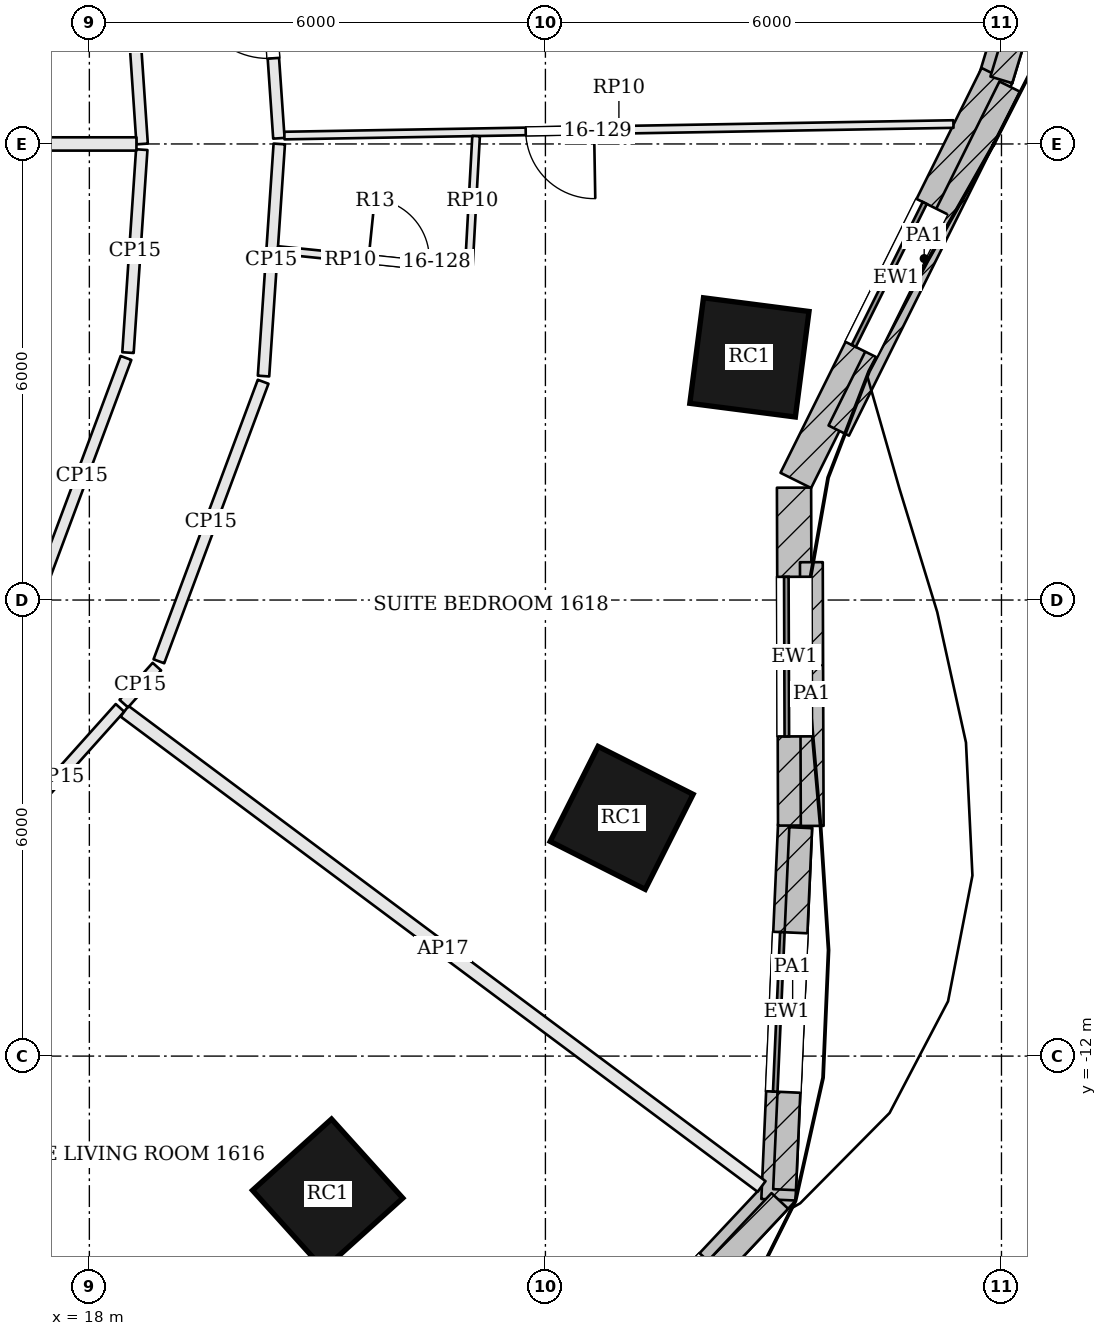
"""IFC4 building model, lengths in metres.
Left out: names, types, materials, properties, quantities, classifications, styles, units other than length and angle.
Written with IfcOpenShell. Run it as: python <this file> out.ifc"""

import sys

from ifc_helpers import new_model, si_unit, direction, frame, frame_2d, origin, origin_2d, place, context, subcontext, project, spatial, rectangle, extrude, element, fill, save


model = new_model("IFC4")
c1 = context("Model", 3, precision=1e-05, world=origin(), true_north=direction((0.0, 1.0)))
c2 = subcontext(c1, "Body", "Model", "MODEL_VIEW")
j1 = project(units=[si_unit("LENGTHUNIT", "METRE"), si_unit("PLANEANGLEUNIT", "RADIAN")], contexts=[c1])
p1 = place(None, origin())
s1 = spatial("IfcSite", under=j1, at=p1, CompositionType="ELEMENT")
p2 = place(p1, origin())
s2 = spatial("IfcBuilding", under=s1, at=p2, CompositionType="ELEMENT")
p3 = place(p2, frame((0.0, 0.0, 73.5)))
s3 = spatial("IfcBuildingStorey", under=s2, at=p3, CompositionType="ELEMENT", Elevation=73.5)
for number, where, z_axis, x_axis in (
    (1, (21.135, -13.817, 0.0), (0.0, 0.0, 1.0), (0.743, 0.67, 0.0)),
    (2, (25.003, -8.866, 0.0), (0.0, 0.0, 1.0), (0.45, 0.893, 0.0)),
    (3, (26.684, -2.808, 0.0), (0.0, 0.0, 1.0), (0.128, 0.992, 0.0)),
):
    element("IfcColumn", number, at=place(p3, frame(where, z_axis=z_axis, x_axis=x_axis)), inside=s3, PredefinedType="COLUMN", context=c2, shape_type="SweptSolid", body=[
        extrude(rectangle(XDim=1.4, YDim=1.4, at=origin_2d()), origin(), (0.0, 0.0, 1.0), 2.8),
    ])
p4 = place(p3, frame((29.927, 0.865, 0.0), z_axis=(0.0, 0.0, 1.0), x_axis=(0.289432445378, 0.957198443147, 0.0)))
e4 = element("IfcWall", 4, at=p4, inside=s3, PredefinedType="SOLIDWALL", context=c2, shape_type="SweptSolid", body=[
    extrude(rectangle(XDim=4.361, YDim=0.45, at=frame_2d((2.181, 0.0))), origin(), (0.0, 0.0, 1.0), 3.3),
])
p5 = place(p4, frame((1.131, 0.0, 0.9)))
e5 = element("IfcOpeningElement", 5, at=p5, cuts=e4, PredefinedType="OPENING", context=c2, shape_type="SweptSolid", body=[
    extrude(rectangle(XDim=2.1, YDim=1.8, at=frame_2d((1.05, 0.9))), frame((0.0, 0.235, 0.0), z_axis=(0.0, -1.0, 0.0), x_axis=(1.0, 0.0, 0.0)), (0.0, 0.0, 1.0), 0.47),
])
p6 = place(p3, frame((23.822, -17.273, 0.0), z_axis=(0.0, 0.0, 1.0), x_axis=(0.684173167988, 0.729319598122, 0.0)))
e6 = element("IfcWall", 6, at=p6, inside=s3, PredefinedType="SOLIDWALL", context=c2, shape_type="SweptSolid", body=[
    extrude(rectangle(XDim=4.829, YDim=0.45, at=frame_2d((2.415, 0.0))), origin(), (0.0, 0.0, 1.0), 3.3),
])
p7 = place(p6, frame((1.365, 0.0, 0.9)))
e7 = element("IfcOpeningElement", 7, at=p7, cuts=e6, PredefinedType="OPENING", context=c2, shape_type="SweptSolid", body=[
    extrude(rectangle(XDim=2.1, YDim=1.8, at=frame_2d((1.05, 0.9))), frame((0.0, 0.235, 0.0), z_axis=(0.0, -1.0, 0.0), x_axis=(1.0, 0.0, 0.0)), (0.0, 0.0, 1.0), 0.47),
])
p8 = place(p3, frame((27.065, -13.89, 0.0), z_axis=(0.0, 0.0, 1.0), x_axis=(0.044544250924, 0.99900741224, 0.0)))
e8 = element("IfcWall", 8, at=p8, inside=s3, PredefinedType="SOLIDWALL", context=c2, shape_type="SweptSolid", body=[
    extrude(rectangle(XDim=4.938, YDim=0.45, at=frame_2d((2.469, 0.0))), origin(), (0.0, 0.0, 1.0), 3.3),
])
p9 = place(p8, frame((1.419, 0.0, 0.9)))
e9 = element("IfcOpeningElement", 9, at=p9, cuts=e8, PredefinedType="OPENING", context=c2, shape_type="SweptSolid", body=[
    extrude(rectangle(XDim=2.1, YDim=1.8, at=frame_2d((1.05, 0.9))), frame((0.0, 0.235, 0.0), z_axis=(0.0, -1.0, 0.0), x_axis=(1.0, 0.0, 0.0)), (0.0, 0.0, 1.0), 0.47),
])
p10 = place(p3, frame((27.285, -8.967, 0.0), z_axis=(0.0, 0.0, 1.0), x_axis=(-0.003185571797, 0.999994926053, 0.0)))
e10 = element("IfcWall", 10, at=p10, inside=s3, PredefinedType="SOLIDWALL", context=c2, shape_type="SweptSolid", body=[
    extrude(rectangle(XDim=4.445, YDim=0.45, at=frame_2d((2.223, 0.0))), origin(), (0.0, 0.0, 1.0), 3.3),
])
p11 = place(p10, frame((1.173, 0.0, 0.9)))
e11 = element("IfcOpeningElement", 11, at=p11, cuts=e10, PredefinedType="OPENING", context=c2, shape_type="SweptSolid", body=[
    extrude(rectangle(XDim=2.1, YDim=1.8, at=frame_2d((1.05, 0.9))), frame((0.0, 0.235, 0.0), z_axis=(0.0, -1.0, 0.0), x_axis=(1.0, 0.0, 0.0)), (0.0, 0.0, 1.0), 0.47),
])
p12 = place(p3, frame((27.294, -4.427, 0.0), z_axis=(0.0, 0.0, 1.0), x_axis=(0.444913249375, 0.895573671191, 0.0)))
e12 = element("IfcWall", 12, at=p12, inside=s3, PredefinedType="SOLIDWALL", context=c2, shape_type="SweptSolid", body=[
    extrude(rectangle(XDim=5.947, YDim=0.45, at=frame_2d((2.974, 0.0))), origin(), (0.0, 0.0, 1.0), 3.3),
])
p13 = place(p12, frame((1.924, 0.0, 0.9)))
e13 = element("IfcOpeningElement", 13, at=p13, cuts=e12, PredefinedType="OPENING", context=c2, shape_type="SweptSolid", body=[
    extrude(rectangle(XDim=2.1, YDim=1.8, at=frame_2d((1.05, 0.9))), frame((0.0, 0.235, 0.0), z_axis=(0.0, -1.0, 0.0), x_axis=(1.0, 0.0, 0.0)), (0.0, 0.0, 1.0), 0.47),
])
p14 = place(p3, frame((29.998, 0.843, 3.6), z_axis=(0.0, 0.0, 1.0), x_axis=(0.289403108737, 0.95720731331, 0.0)))
e14 = element("IfcWall", 14, at=p14, inside=s3, PredefinedType="PARAPET", context=c2, shape_type="SweptSolid", body=[
    extrude(rectangle(XDim=4.205, YDim=0.3, at=frame_2d((2.103, 0.0))), origin(), (0.0, 0.0, 1.0), 1.1),
])
p15 = place(p3, frame((23.972, -17.222, 3.6), z_axis=(0.0, 0.0, 1.0), x_axis=(0.684173231326, 0.729319538705, 0.0)))
e15 = element("IfcWall", 15, at=p15, inside=s3, PredefinedType="PARAPET", context=c2, shape_type="SweptSolid", body=[
    extrude(rectangle(XDim=4.548, YDim=0.3, at=frame_2d((2.274, 0.0))), origin(), (0.0, 0.0, 1.0), 1.1),
])
p16 = place(p3, frame((27.146, -13.757, 3.6), z_axis=(0.0, 0.0, 1.0), x_axis=(0.044503972994, 0.999009207359, 0.0)))
e16 = element("IfcWall", 16, at=p16, inside=s3, PredefinedType="PARAPET", context=c2, shape_type="SweptSolid", body=[
    extrude(rectangle(XDim=4.767, YDim=0.3, at=frame_2d((2.384, 0.0))), origin(), (0.0, 0.0, 1.0), 1.1),
])
p17 = place(p3, frame((27.51, -8.972, 3.6), z_axis=(0.0, 0.0, 1.0), x_axis=(-0.003236912182, 0.999994761186, 0.0)))
e17 = element("IfcWall", 17, at=p17, inside=s3, PredefinedType="PARAPET", context=c2, shape_type="SweptSolid", body=[
    extrude(rectangle(XDim=3.469, YDim=0.3, at=frame_2d((1.735, 0.0))), origin(), (0.0, 0.0, 1.0), 1.1),
])
p18 = place(p3, frame((27.859, -3.771, 3.6), z_axis=(0.0, 0.0, 1.0), x_axis=(0.444912677503, 0.895573955292, 0.0)))
e18 = element("IfcWall", 18, at=p18, inside=s3, PredefinedType="PARAPET", context=c2, shape_type="SweptSolid", body=[
    extrude(rectangle(XDim=5.054, YDim=0.3, at=frame_2d((2.527, 0.0))), origin(), (0.0, 0.0, 1.0), 1.1),
])
p19 = place(p3, frame((16.781, -9.228, 0.0), z_axis=(0.0, 0.0, 1.0), x_axis=(0.667308710912, 0.744781232538, 0.0)))
e19 = element("IfcWall", 19, at=p19, inside=s3, PredefinedType="PARTITIONING", context=c2, shape_type="SweptSolid", body=[
    extrude(rectangle(XDim=2.43, YDim=0.15, at=frame_2d((1.215, 0.0))), origin(), (0.0, 0.0, 1.0), 2.684),
])
p20 = place(p3, frame((26.844, -13.716, 0.0), z_axis=(0.0, 0.0, 1.0), x_axis=(-0.801529984423, 0.597954583619, 0.0)))
e20 = element("IfcWall", 20, at=p20, inside=s3, PredefinedType="PARTITIONING", context=c2, shape_type="SweptSolid", body=[
    extrude(rectangle(XDim=10.456, YDim=0.175, at=frame_2d((5.228, 0.0))), origin(), (0.0, 0.0, 1.0), 2.798),
])
p21 = place(p3, frame((18.453, -7.362, 0.0), z_axis=(0.0, 0.0, 1.0), x_axis=(0.667330462125, 0.744761743325, 0.0)))
e21 = element("IfcWall", 21, at=p21, inside=s3, PredefinedType="PARTITIONING", context=c2, shape_type="SweptSolid", body=[
    extrude(rectangle(XDim=0.653, YDim=0.15, at=frame_2d((0.326, 0.0))), origin(), (0.0, 0.0, 1.0), 2.684),
])
p22 = place(p3, frame((18.915, -6.806, 0.0), z_axis=(0.0, 0.0, 1.0), x_axis=(0.349452792603, 0.936953972051, 0.0)))
e22 = element("IfcWall", 22, at=p22, inside=s3, PredefinedType="PARTITIONING", context=c2, shape_type="SweptSolid", body=[
    extrude(rectangle(XDim=3.925, YDim=0.15, at=frame_2d((1.962, 0.0))), origin(), (0.0, 0.0, 1.0), 2.684),
])
p23 = place(p3, frame((20.292, -3.053, 0.0), z_axis=(0.0, 0.0, 1.0), x_axis=(0.067646719267, 0.997709337118, 0.0)))
e23 = element("IfcWall", 23, at=p23, inside=s3, PredefinedType="PARTITIONING", context=c2, shape_type="SweptSolid", body=[
    extrude(rectangle(XDim=3.061, YDim=0.15, at=frame_2d((1.53, 0.0))), origin(), (0.0, 0.0, 1.0), 2.684),
])
p24 = place(p3, frame((20.493, 0.075, 0.0), z_axis=(0.0, 0.0, 1.0), x_axis=(-0.068600445792, 0.997644214556, 0.0)))
e24 = element("IfcWall", 24, at=p24, inside=s3, PredefinedType="PARTITIONING", context=c2, shape_type="SweptSolid", body=[
    extrude(rectangle(XDim=3.075, YDim=0.15, at=frame_2d((1.538, 0.0))), origin(), (0.0, 0.0, 1.0), 2.684),
])
p25 = place(p24, frame((1.055, 0.0, 0.0)))
e25 = element("IfcOpeningElement", 25, at=p25, cuts=e24, PredefinedType="OPENING", context=c2, shape_type="SweptSolid", body=[
    extrude(rectangle(XDim=1.0, YDim=2.1, at=frame_2d((0.5, 1.05))), frame((0.0, 0.085, 0.0), z_axis=(0.0, -1.0, 0.0), x_axis=(1.0, 0.0, 0.0)), (0.0, 0.0, 1.0), 0.17),
])
p26 = place(p3, frame((18.508, 2.742, 0.0), z_axis=(0.0, 0.0, 1.0), x_axis=(0.067774714774, -0.997700650515, 0.0)))
e26 = element("IfcWall", 26, at=p26, inside=s3, PredefinedType="PARTITIONING", context=c2, shape_type="SweptSolid", body=[
    extrude(rectangle(XDim=2.749, YDim=0.15, at=frame_2d((1.374, 0.0))), origin(), (0.0, 0.0, 1.0), 2.684),
])
p27 = place(p3, frame((18.689, -0.075, 0.0), z_axis=(0.0, 0.0, 1.0), x_axis=(-0.067687508044, -0.997706570718, 0.0)))
e27 = element("IfcWall", 27, at=p27, inside=s3, PredefinedType="PARTITIONING", context=c2, shape_type="SweptSolid", body=[
    extrude(rectangle(XDim=2.676, YDim=0.15, at=frame_2d((1.338, 0.0))), origin(), (0.0, 0.0, 1.0), 2.684),
])
p28 = place(p3, frame((18.482, -2.815, 0.0), z_axis=(0.0, 0.0, 1.0), x_axis=(-0.349448047934, -0.936955741642, 0.0)))
e28 = element("IfcWall", 28, at=p28, inside=s3, PredefinedType="PARTITIONING", context=c2, shape_type="SweptSolid", body=[
    extrude(rectangle(XDim=3.323, YDim=0.15, at=frame_2d((1.661, 0.0))), origin(), (0.0, 0.0, 1.0), 2.684),
])
p29 = place(p3, frame((29.368, 0.262, 0.0), z_axis=(0.0, 0.0, 1.0), x_axis=(-0.99985120268, -0.017250289805, 0.0)))
e29 = element("IfcWall", 29, at=p29, inside=s3, PredefinedType="PARTITIONING", context=c2, shape_type="SweptSolid", body=[
    extrude(rectangle(XDim=8.803, YDim=0.1, at=frame_2d((4.401, 0.0))), origin(), (0.0, 0.0, 1.0), 2.784),
])
p30 = place(p29, frame((4.728, 0.0, 0.0)))
e30 = element("IfcOpeningElement", 30, at=p30, cuts=e29, PredefinedType="OPENING", context=c2, shape_type="SweptSolid", body=[
    extrude(rectangle(XDim=0.9, YDim=2.4, at=frame_2d((0.45, 1.2))), frame((0.0, 0.06, 0.0), z_axis=(0.0, -1.0, 0.0), x_axis=(1.0, 0.0, 0.0)), (0.0, 0.0, 1.0), 0.12),
])
p31 = place(p3, frame((20.479, -1.395, 0.0), z_axis=(0.0, 0.0, 1.0), x_axis=(0.994803809099, -0.101810517152, 0.0)))
e31 = element("IfcWall", 31, at=p31, inside=s3, PredefinedType="PARTITIONING", context=c2, shape_type="SweptSolid", body=[
    extrude(rectangle(XDim=2.525, YDim=0.1, at=frame_2d((1.263, 0.0))), origin(), (0.0, 0.0, 1.0), 2.784),
])
p32 = place(p31, frame((1.2, 0.0, 0.0)))
e32 = element("IfcOpeningElement", 32, at=p32, cuts=e31, PredefinedType="OPENING", context=c2, shape_type="SweptSolid", body=[
    extrude(rectangle(XDim=0.8, YDim=2.1, at=frame_2d((0.4, 1.05))), frame((0.0, 0.06, 0.0), z_axis=(0.0, -1.0, 0.0), x_axis=(1.0, 0.0, 0.0)), (0.0, 0.0, 1.0), 0.12),
])
p33 = place(p3, frame((22.994, -1.602, 0.0), z_axis=(0.0, 0.0, 1.0), x_axis=(0.055145604925, 0.998478323379, 0.0)))
e33 = element("IfcWall", 33, at=p33, inside=s3, PredefinedType="PARTITIONING", context=c2, shape_type="SweptSolid", body=[
    extrude(rectangle(XDim=1.709, YDim=0.1, at=frame_2d((0.854, 0.0))), origin(), (0.0, 0.0, 1.0), 2.784),
])
p34 = place(p3, frame((14.875, 0.0, 0.0), z_axis=(0.0, 0.0, 1.0), x_axis=(1.0, 0.0, 0.0)))
e34 = element("IfcWall", 34, at=p34, inside=s3, PredefinedType="PARTITIONING", context=c2, shape_type="SweptSolid", body=[
    extrude(rectangle(XDim=3.744, YDim=0.175, at=frame_2d((1.872, 0.0))), origin(), (0.0, 0.0, 1.0), 2.798),
])
p35 = place(p9, origin())
e35 = element("IfcWindow", 35, at=p35, inside=s3, PartitioningType="SINGLE_PANEL", PredefinedType="WINDOW", context=c2, shape_type="SweptSolid", body=[
    extrude(rectangle(XDim=2.1, YDim=1.8, at=frame_2d((1.05, 0.9))), frame((0.0, 0.135, 0.0), z_axis=(0.0, -1.0, 0.0), x_axis=(1.0, 0.0, 0.0)), (0.0, 0.0, 1.0), 0.06),
])
fill(e9, e35)
p36 = place(p11, origin())
e36 = element("IfcWindow", 36, at=p36, inside=s3, PartitioningType="SINGLE_PANEL", PredefinedType="WINDOW", context=c2, shape_type="SweptSolid", body=[
    extrude(rectangle(XDim=2.1, YDim=1.8, at=frame_2d((1.05, 0.9))), frame((0.0, 0.135, 0.0), z_axis=(0.0, -1.0, 0.0), x_axis=(1.0, 0.0, 0.0)), (0.0, 0.0, 1.0), 0.06),
])
fill(e11, e36)
p37 = place(p13, origin())
e37 = element("IfcWindow", 37, at=p37, inside=s3, PartitioningType="SINGLE_PANEL", PredefinedType="WINDOW", context=c2, shape_type="SweptSolid", body=[
    extrude(rectangle(XDim=2.1, YDim=1.8, at=frame_2d((1.05, 0.9))), frame((0.0, 0.135, 0.0), z_axis=(0.0, -1.0, 0.0), x_axis=(1.0, 0.0, 0.0)), (0.0, 0.0, 1.0), 0.06),
])
fill(e13, e37)
p38 = place(p32, origin())
e38 = element("IfcDoor", 38, at=p38, inside=s3, OperationType="SINGLE_SWING_LEFT", PredefinedType="DOOR", context=c2, shape_type="SweptSolid", body=[
    extrude(rectangle(XDim=0.8, YDim=2.1, at=frame_2d((0.4, 1.05))), frame((0.0, 0.025, 0.0), z_axis=(0.0, -1.0, 0.0), x_axis=(1.0, 0.0, 0.0)), (0.0, 0.0, 1.0), 0.05),
])
fill(e32, e38)
p39 = place(p30, origin())
e39 = element("IfcDoor", 39, at=p39, inside=s3, OperationType="SINGLE_SWING_LEFT", PredefinedType="DOOR", context=c2, shape_type="SweptSolid", body=[
    extrude(rectangle(XDim=0.9, YDim=2.4, at=frame_2d((0.45, 1.2))), frame((0.0, 0.025, 0.0), z_axis=(0.0, -1.0, 0.0), x_axis=(1.0, 0.0, 0.0)), (0.0, 0.0, 1.0), 0.05),
])
fill(e30, e39)
p40 = place(p25, origin())
e40 = element("IfcDoor", 40, at=p40, inside=s3, OperationType="SINGLE_SWING_RIGHT", PredefinedType="DOOR", context=c2, shape_type="SweptSolid", body=[
    extrude(rectangle(XDim=1.0, YDim=2.1, at=frame_2d((0.5, 1.05))), frame((0.0, 0.025, 0.0), z_axis=(0.0, -1.0, 0.0), x_axis=(1.0, 0.0, 0.0)), (0.0, 0.0, 1.0), 0.05),
])
fill(e25, e40)
save(model, sys.argv[1])
